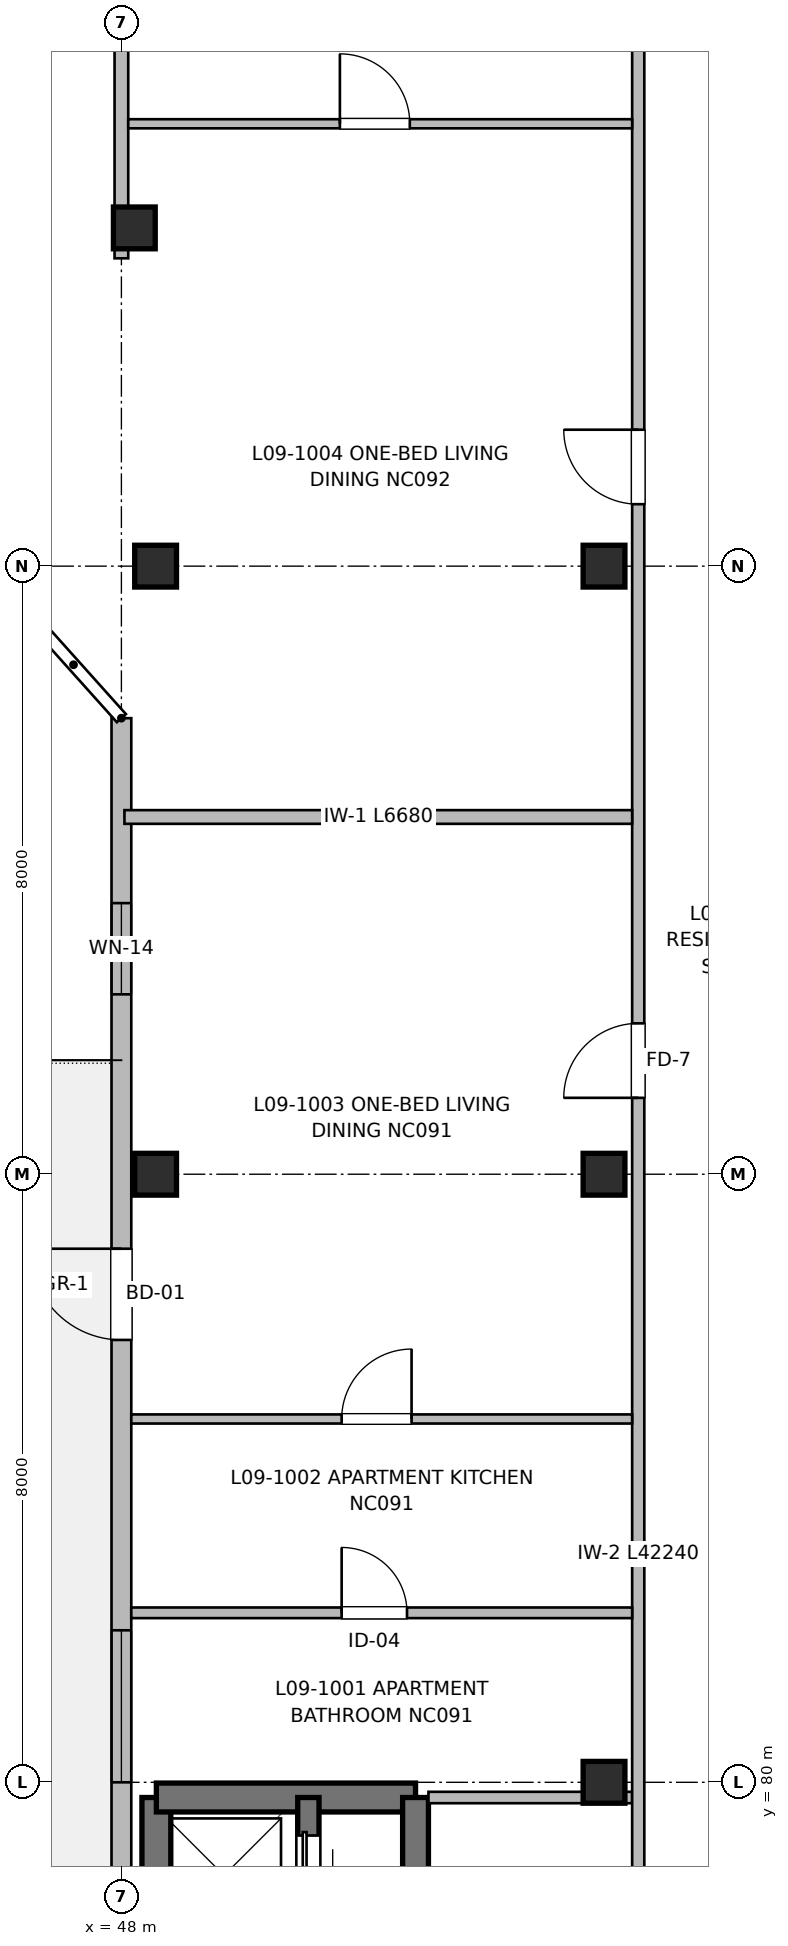
"""IFC4 building model, lengths in metres.
Left out: names, types, materials, properties, quantities, classifications, styles, units other than length and angle.
Written with IfcOpenShell. Run it as: python <this file> out.ifc"""

import sys

from ifc_helpers import new_model, si_unit, direction, frame, frame_2d, origin, origin_2d, place, context, subcontext, project, spatial, rectangle, extrude, element, fill, save


model = new_model("IFC4")
c1 = context("Model", 3, precision=1e-05, world=origin(), true_north=direction((0.0, 1.0)))
c2 = subcontext(c1, "Body", "Model", "MODEL_VIEW")
j1 = project(units=[si_unit("LENGTHUNIT", "METRE"), si_unit("PLANEANGLEUNIT", "RADIAN")], contexts=[c1])
p1 = place(None, origin())
s1 = spatial("IfcSite", under=j1, at=p1, CompositionType="ELEMENT")
p2 = place(p1, origin())
s2 = spatial("IfcBuilding", under=s1, at=p2, CompositionType="ELEMENT")
p3 = place(p2, frame((0.0, 0.0, 29.76)))
s3 = spatial("IfcBuildingStorey", under=s2, at=p3, CompositionType="ELEMENT", Elevation=29.76)
for number, where, z_axis, x_axis in (
    (1, (48.17, 100.45, 0.0), (0.0, 0.0, 1.0), (1.0, 0.0, 0.0)),
    (2, (48.45, 88.0, 0.0), (0.0, 0.0, 1.0), (1.0, 0.0, 0.0)),
    (3, (48.45, 96.0, 0.0), (0.0, 0.0, 1.0), (1.0, 0.0, 0.0)),
    (4, (54.35, 80.0, 0.0), (0.0, 0.0, 1.0), (1.0, 0.0, 0.0)),
    (5, (54.35, 88.0, 0.0), (0.0, 0.0, 1.0), (1.0, 0.0, 0.0)),
    (6, (54.35, 96.0, 0.0), (0.0, 0.0, 1.0), (1.0, 0.0, 0.0)),
):
    element("IfcColumn", number, at=place(p3, frame(where, z_axis=z_axis, x_axis=x_axis)), inside=s3, PredefinedType="COLUMN", context=c2, shape_type="SweptSolid", body=[
        extrude(rectangle(XDim=0.55, YDim=0.55, at=origin_2d()), origin(), (0.0, 0.0, 1.0), 3.2),
    ])
p4 = place(p3, frame((48.46, 67.35, 0.0), z_axis=(0.0, 0.0, 1.0), x_axis=(0.0, 1.0, 0.0)))
e7 = element("IfcWall", 7, at=p4, inside=s3, PredefinedType="SHEAR", context=c2, shape_type="SweptSolid", body=[
    extrude(rectangle(XDim=12.45, YDim=0.38, at=frame_2d((6.225, 0.0))), origin(), (0.0, 0.0, 1.0), 3.2),
])
p5 = place(p4, frame((2.2, 0.0, 0.97)))
e8 = element("IfcOpeningElement", 8, at=p5, cuts=e7, PredefinedType="OPENING", context=c2, shape_type="SweptSolid", body=[
    extrude(rectangle(XDim=0.95, YDim=1.25, at=frame_2d((0.475, 0.625))), frame((0.0, 0.2, 0.0), z_axis=(0.0, -1.0, 0.0), x_axis=(1.0, 0.0, 0.0)), (0.0, 0.0, 1.0), 0.4),
])
p6 = place(p3, frame((48.46, 79.8, 0.0), z_axis=(0.0, 0.0, 1.0), x_axis=(1.0, 0.0, 0.0)))
e9 = element("IfcWall", 9, at=p6, inside=s3, PredefinedType="SHEAR", context=c2, shape_type="SweptSolid", body=[
    extrude(rectangle(XDim=3.41, YDim=0.38, at=frame_2d((1.705, 0.0))), origin(), (0.0, 0.0, 1.0), 3.2),
])
p7 = place(p3, frame((51.87, 79.8, 0.0), z_axis=(0.0, 0.0, 1.0), x_axis=(0.0, -1.0, 0.0)))
e10 = element("IfcWall", 10, at=p7, inside=s3, PredefinedType="SHEAR", context=c2, shape_type="SweptSolid", body=[
    extrude(rectangle(XDim=12.45, YDim=0.34, at=frame_2d((6.225, 0.0))), origin(), (0.0, 0.0, 1.0), 3.2),
])
p8 = place(p7, frame((10.85, 0.0, 0.0)))
e11 = element("IfcOpeningElement", 11, at=p8, cuts=e10, PredefinedType="OPENING", context=c2, shape_type="SweptSolid", body=[
    extrude(rectangle(XDim=1.05, YDim=2.15, at=frame_2d((0.525, 1.075))), frame((0.0, 0.18, 0.0), z_axis=(0.0, -1.0, 0.0), x_axis=(1.0, 0.0, 0.0)), (0.0, 0.0, 1.0), 0.36),
])
p9 = place(p3, frame((50.46, 74.55, 0.0), z_axis=(0.0, 0.0, 1.0), x_axis=(0.0, 1.0, 0.0)))
e12 = element("IfcWall", 12, at=p9, inside=s3, PredefinedType="SHEAR", context=c2, shape_type="SweptSolid", body=[
    extrude(rectangle(XDim=5.25, YDim=0.28, at=frame_2d((2.625, 0.0))), origin(), (0.0, 0.0, 1.0), 3.2),
])
p10 = place(p9, frame((1.15, 0.0, 0.0)))
e13 = element("IfcOpeningElement", 13, at=p10, cuts=e12, PredefinedType="OPENING", context=c2, shape_type="SweptSolid", body=[
    extrude(rectangle(XDim=1.0, YDim=2.15, at=frame_2d((0.5, 1.075))), frame((0.0, 0.15, 0.0), z_axis=(0.0, -1.0, 0.0), x_axis=(1.0, 0.0, 0.0)), (0.0, 0.0, 1.0), 0.3),
])
p11 = place(p9, frame((3.85, 0.0, 0.0)))
e14 = element("IfcOpeningElement", 14, at=p11, cuts=e12, PredefinedType="OPENING", context=c2, shape_type="SweptSolid", body=[
    extrude(rectangle(XDim=0.9, YDim=2.15, at=frame_2d((0.45, 1.075))), frame((0.0, 0.15, 0.0), z_axis=(0.0, -1.0, 0.0), x_axis=(1.0, 0.0, 0.0)), (0.0, 0.0, 1.0), 0.3),
])
p12 = place(p3, frame((48.0, 64.4, 0.0), z_axis=(0.0, 0.0, 1.0), x_axis=(0.0, 1.0, 0.0)))
e15 = element("IfcWall", 15, at=p12, inside=s3, PredefinedType="SOLIDWALL", context=c2, shape_type="SweptSolid", body=[
    extrude(rectangle(XDim=29.6, YDim=0.26, at=frame_2d((14.8, 0.0))), origin(), (0.0, 0.0, 1.0), 2.98),
])
p13 = place(p12, frame((4.033, 0.0, 0.72)))
e16 = element("IfcOpeningElement", 16, at=p13, cuts=e15, PredefinedType="OPENING", context=c2, shape_type="SweptSolid", body=[
    extrude(rectangle(XDim=1.8, YDim=1.5, at=frame_2d((0.9, 0.75))), frame((0.0, 0.14, 0.0), z_axis=(0.0, -1.0, 0.0), x_axis=(1.0, 0.0, 0.0)), (0.0, 0.0, 1.0), 0.28),
])
p14 = place(p12, frame((15.6, 0.0, 0.72)))
e17 = element("IfcOpeningElement", 17, at=p14, cuts=e15, PredefinedType="OPENING", context=c2, shape_type="SweptSolid", body=[
    extrude(rectangle(XDim=2.0, YDim=1.5, at=frame_2d((1.0, 0.75))), frame((0.0, 0.14, 0.0), z_axis=(0.0, -1.0, 0.0), x_axis=(1.0, 0.0, 0.0)), (0.0, 0.0, 1.0), 0.28),
])
p15 = place(p12, frame((21.42, 0.0, 0.0)))
e18 = element("IfcOpeningElement", 18, at=p15, cuts=e15, PredefinedType="OPENING", context=c2, shape_type="SweptSolid", body=[
    extrude(rectangle(XDim=1.2, YDim=2.2, at=frame_2d((0.6, 1.1))), frame((0.0, 0.14, 0.0), z_axis=(0.0, -1.0, 0.0), x_axis=(1.0, 0.0, 0.0)), (0.0, 0.0, 1.0), 0.28),
])
p16 = place(p12, frame((25.967, 0.0, 0.9)))
e19 = element("IfcOpeningElement", 19, at=p16, cuts=e15, PredefinedType="OPENING", context=c2, shape_type="SweptSolid", body=[
    extrude(rectangle(XDim=1.2, YDim=1.05, at=frame_2d((0.6, 0.525))), frame((0.0, 0.14, 0.0), z_axis=(0.0, -1.0, 0.0), x_axis=(1.0, 0.0, 0.0)), (0.0, 0.0, 1.0), 0.28),
])
p17 = place(p3, frame((52.04, 79.8, 0.0), z_axis=(0.0, 0.0, 1.0), x_axis=(1.0, 0.0, 0.0)))
e20 = element("IfcWall", 20, at=p17, inside=s3, PredefinedType="PARTITIONING", context=c2, shape_type="SweptSolid", body=[
    extrude(rectangle(XDim=2.68, YDim=0.15, at=frame_2d((1.34, 0.0))), origin(), (0.0, 0.0, 1.0), 2.935),
])
p18 = place(p3, frame((54.8, 64.56, 0.0), z_axis=(0.0, 0.0, 1.0), x_axis=(0.0, 1.0, 0.0)))
e21 = element("IfcWall", 21, at=p18, inside=s3, PredefinedType="PARTITIONING", context=c2, shape_type="SweptSolid", body=[
    extrude(rectangle(XDim=42.24, YDim=0.16, at=frame_2d((21.12, 0.0))), origin(), (0.0, 0.0, 1.0), 2.935),
])
p19 = place(p18, frame((4.44, 0.0, 0.0)))
e22 = element("IfcOpeningElement", 22, at=p19, cuts=e21, PredefinedType="OPENING", context=c2, shape_type="SweptSolid", body=[
    extrude(rectangle(XDim=1.1, YDim=2.15, at=frame_2d((0.55, 1.075))), frame((0.0, 0.09, 0.0), z_axis=(0.0, -1.0, 0.0), x_axis=(1.0, 0.0, 0.0)), (0.0, 0.0, 1.0), 0.18),
])
p20 = place(p18, frame((10.84, 0.0, 0.0)))
e23 = element("IfcOpeningElement", 23, at=p20, cuts=e21, PredefinedType="OPENING", context=c2, shape_type="SweptSolid", body=[
    extrude(rectangle(XDim=1.6, YDim=2.15, at=frame_2d((0.8, 1.075))), frame((0.0, 0.09, 0.0), z_axis=(0.0, -1.0, 0.0), x_axis=(1.0, 0.0, 0.0)), (0.0, 0.0, 1.0), 0.18),
])
p21 = place(p18, frame((24.445, 0.0, 0.0)))
e24 = element("IfcOpeningElement", 24, at=p21, cuts=e21, PredefinedType="OPENING", context=c2, shape_type="SweptSolid", body=[
    extrude(rectangle(XDim=0.98, YDim=2.15, at=frame_2d((0.49, 1.075))), frame((0.0, 0.09, 0.0), z_axis=(0.0, -1.0, 0.0), x_axis=(1.0, 0.0, 0.0)), (0.0, 0.0, 1.0), 0.18),
])
p22 = place(p18, frame((32.255, 0.0, 0.0)))
e25 = element("IfcOpeningElement", 25, at=p22, cuts=e21, PredefinedType="OPENING", context=c2, shape_type="SweptSolid", body=[
    extrude(rectangle(XDim=0.98, YDim=2.15, at=frame_2d((0.49, 1.075))), frame((0.0, 0.09, 0.0), z_axis=(0.0, -1.0, 0.0), x_axis=(1.0, 0.0, 0.0)), (0.0, 0.0, 1.0), 0.18),
])
p23 = place(p3, frame((48.0, 100.05, 0.0), z_axis=(0.0, 0.0, 1.0), x_axis=(0.0, 1.0, 0.0)))
e26 = element("IfcWall", 26, at=p23, inside=s3, PredefinedType="PARTITIONING", context=c2, shape_type="SweptSolid", body=[
    extrude(rectangle(XDim=6.67, YDim=0.18, at=frame_2d((3.335, 0.0))), origin(), (0.0, 0.0, 1.0), 2.68),
])
p24 = place(p3, frame((48.04, 92.7, 0.0), z_axis=(0.0, 0.0, 1.0), x_axis=(1.0, 0.0, 0.0)))
e27 = element("IfcWall", 27, at=p24, inside=s3, PredefinedType="PARTITIONING", context=c2, shape_type="SweptSolid", body=[
    extrude(rectangle(XDim=6.68, YDim=0.18, at=frame_2d((3.34, 0.0))), origin(), (0.0, 0.0, 1.0), 2.935),
])
p25 = place(p3, frame((48.13, 82.23, 0.0), z_axis=(0.0, 0.0, 1.0), x_axis=(1.0, 0.0, 0.0)))
e28 = element("IfcWall", 28, at=p25, inside=s3, PredefinedType="PARTITIONING", context=c2, shape_type="SweptSolid", body=[
    extrude(rectangle(XDim=6.59, YDim=0.14, at=frame_2d((3.295, 0.0))), origin(), (0.0, 0.0, 1.0), 2.935),
])
p26 = place(p25, frame((2.768, 0.0, 0.0)))
e29 = element("IfcOpeningElement", 29, at=p26, cuts=e28, PredefinedType="OPENING", context=c2, shape_type="SweptSolid", body=[
    extrude(rectangle(XDim=0.86, YDim=2.1, at=frame_2d((0.43, 1.05))), frame((0.0, 0.08, 0.0), z_axis=(0.0, -1.0, 0.0), x_axis=(1.0, 0.0, 0.0)), (0.0, 0.0, 1.0), 0.16),
])
p27 = place(p3, frame((48.13, 84.78, 0.0), z_axis=(0.0, 0.0, 1.0), x_axis=(1.0, 0.0, 0.0)))
e30 = element("IfcWall", 30, at=p27, inside=s3, PredefinedType="PARTITIONING", context=c2, shape_type="SweptSolid", body=[
    extrude(rectangle(XDim=6.59, YDim=0.12, at=frame_2d((3.295, 0.0))), origin(), (0.0, 0.0, 1.0), 2.935),
])
p28 = place(p27, frame((2.768, 0.0, 0.0)))
e31 = element("IfcOpeningElement", 31, at=p28, cuts=e30, PredefinedType="OPENING", context=c2, shape_type="SweptSolid", body=[
    extrude(rectangle(XDim=0.92, YDim=2.1, at=frame_2d((0.46, 1.05))), frame((0.0, 0.07, 0.0), z_axis=(0.0, -1.0, 0.0), x_axis=(1.0, 0.0, 0.0)), (0.0, 0.0, 1.0), 0.14),
])
p29 = place(p3, frame((48.09, 101.82, 0.0), z_axis=(0.0, 0.0, 1.0), x_axis=(1.0, 0.0, 0.0)))
e32 = element("IfcWall", 32, at=p29, inside=s3, PredefinedType="PARTITIONING", context=c2, shape_type="SweptSolid", body=[
    extrude(rectangle(XDim=6.63, YDim=0.12, at=frame_2d((3.315, 0.0))), origin(), (0.0, 0.0, 1.0), 2.935),
])
p30 = place(p29, frame((2.785, 0.0, 0.0)))
e33 = element("IfcOpeningElement", 33, at=p30, cuts=e32, PredefinedType="OPENING", context=c2, shape_type="SweptSolid", body=[
    extrude(rectangle(XDim=0.92, YDim=2.1, at=frame_2d((0.46, 1.05))), frame((0.0, 0.07, 0.0), z_axis=(0.0, -1.0, 0.0), x_axis=(1.0, 0.0, 0.0)), (0.0, 0.0, 1.0), 0.14),
])
p31 = place(p11, origin())
e34 = element("IfcDoor", 34, at=p31, inside=s3, OperationType="SLIDING_TO_RIGHT", PredefinedType="DOOR", context=c2, shape_type="SweptSolid", body=[
    extrude(rectangle(XDim=0.9, YDim=2.15, at=frame_2d((0.45, 1.075))), frame((0.0, 0.025, 0.0), z_axis=(0.0, -1.0, 0.0), x_axis=(1.0, 0.0, 0.0)), (0.0, 0.0, 1.0), 0.05),
])
fill(e14, e34)
p32 = place(p14, origin())
e35 = element("IfcWindow", 35, at=p32, inside=s3, PartitioningType="SINGLE_PANEL", PredefinedType="WINDOW", context=c2, shape_type="SweptSolid", body=[
    extrude(rectangle(XDim=2.0, YDim=1.5, at=frame_2d((1.0, 0.75))), frame((0.0, 0.03, 0.0), z_axis=(0.0, -1.0, 0.0), x_axis=(1.0, 0.0, 0.0)), (0.0, 0.0, 1.0), 0.06),
])
fill(e17, e35)
p33 = place(p15, origin())
e36 = element("IfcDoor", 36, at=p33, inside=s3, OperationType="SINGLE_SWING_RIGHT", PredefinedType="DOOR", context=c2, shape_type="SweptSolid", body=[
    extrude(rectangle(XDim=1.2, YDim=2.2, at=frame_2d((0.6, 1.1))), frame((0.0, 0.025, 0.0), z_axis=(0.0, -1.0, 0.0), x_axis=(1.0, 0.0, 0.0)), (0.0, 0.0, 1.0), 0.05),
])
fill(e18, e36)
p34 = place(p16, origin())
e37 = element("IfcWindow", 37, at=p34, inside=s3, PartitioningType="SINGLE_PANEL", PredefinedType="WINDOW", context=c2, shape_type="SweptSolid", body=[
    extrude(rectangle(XDim=1.2, YDim=1.05, at=frame_2d((0.6, 0.525))), frame((0.0, 0.03, 0.0), z_axis=(0.0, -1.0, 0.0), x_axis=(1.0, 0.0, 0.0)), (0.0, 0.0, 1.0), 0.06),
])
fill(e19, e37)
p35 = place(p26, origin())
e38 = element("IfcDoor", 38, at=p35, inside=s3, OperationType="SINGLE_SWING_LEFT", PredefinedType="DOOR", context=c2, shape_type="SweptSolid", body=[
    extrude(rectangle(XDim=0.86, YDim=2.1, at=frame_2d((0.43, 1.05))), frame((0.0, 0.025, 0.0), z_axis=(0.0, -1.0, 0.0), x_axis=(1.0, 0.0, 0.0)), (0.0, 0.0, 1.0), 0.05),
])
fill(e29, e38)
p36 = place(p28, origin())
e39 = element("IfcDoor", 39, at=p36, inside=s3, OperationType="SINGLE_SWING_RIGHT", PredefinedType="DOOR", context=c2, shape_type="SweptSolid", body=[
    extrude(rectangle(XDim=0.92, YDim=2.1, at=frame_2d((0.46, 1.05))), frame((0.0, 0.025, 0.0), z_axis=(0.0, -1.0, 0.0), x_axis=(1.0, 0.0, 0.0)), (0.0, 0.0, 1.0), 0.05),
])
fill(e31, e39)
p37 = place(p21, origin())
e40 = element("IfcDoor", 40, at=p37, inside=s3, OperationType="SINGLE_SWING_LEFT", PredefinedType="DOOR", context=c2, shape_type="SweptSolid", body=[
    extrude(rectangle(XDim=0.98, YDim=2.15, at=frame_2d((0.49, 1.075))), frame((0.0, 0.025, 0.0), z_axis=(0.0, -1.0, 0.0), x_axis=(1.0, 0.0, 0.0)), (0.0, 0.0, 1.0), 0.05),
])
fill(e24, e40)
p38 = place(p30, origin())
e41 = element("IfcDoor", 41, at=p38, inside=s3, OperationType="SINGLE_SWING_LEFT", PredefinedType="DOOR", context=c2, shape_type="SweptSolid", body=[
    extrude(rectangle(XDim=0.92, YDim=2.1, at=frame_2d((0.46, 1.05))), frame((0.0, 0.025, 0.0), z_axis=(0.0, -1.0, 0.0), x_axis=(1.0, 0.0, 0.0)), (0.0, 0.0, 1.0), 0.05),
])
fill(e33, e41)
p39 = place(p22, origin())
e42 = element("IfcDoor", 42, at=p39, inside=s3, OperationType="SINGLE_SWING_RIGHT", PredefinedType="DOOR", context=c2, shape_type="SweptSolid", body=[
    extrude(rectangle(XDim=0.98, YDim=2.15, at=frame_2d((0.49, 1.075))), frame((0.0, 0.025, 0.0), z_axis=(0.0, -1.0, 0.0), x_axis=(1.0, 0.0, 0.0)), (0.0, 0.0, 1.0), 0.05),
])
fill(e25, e42)
save(model, sys.argv[1])
